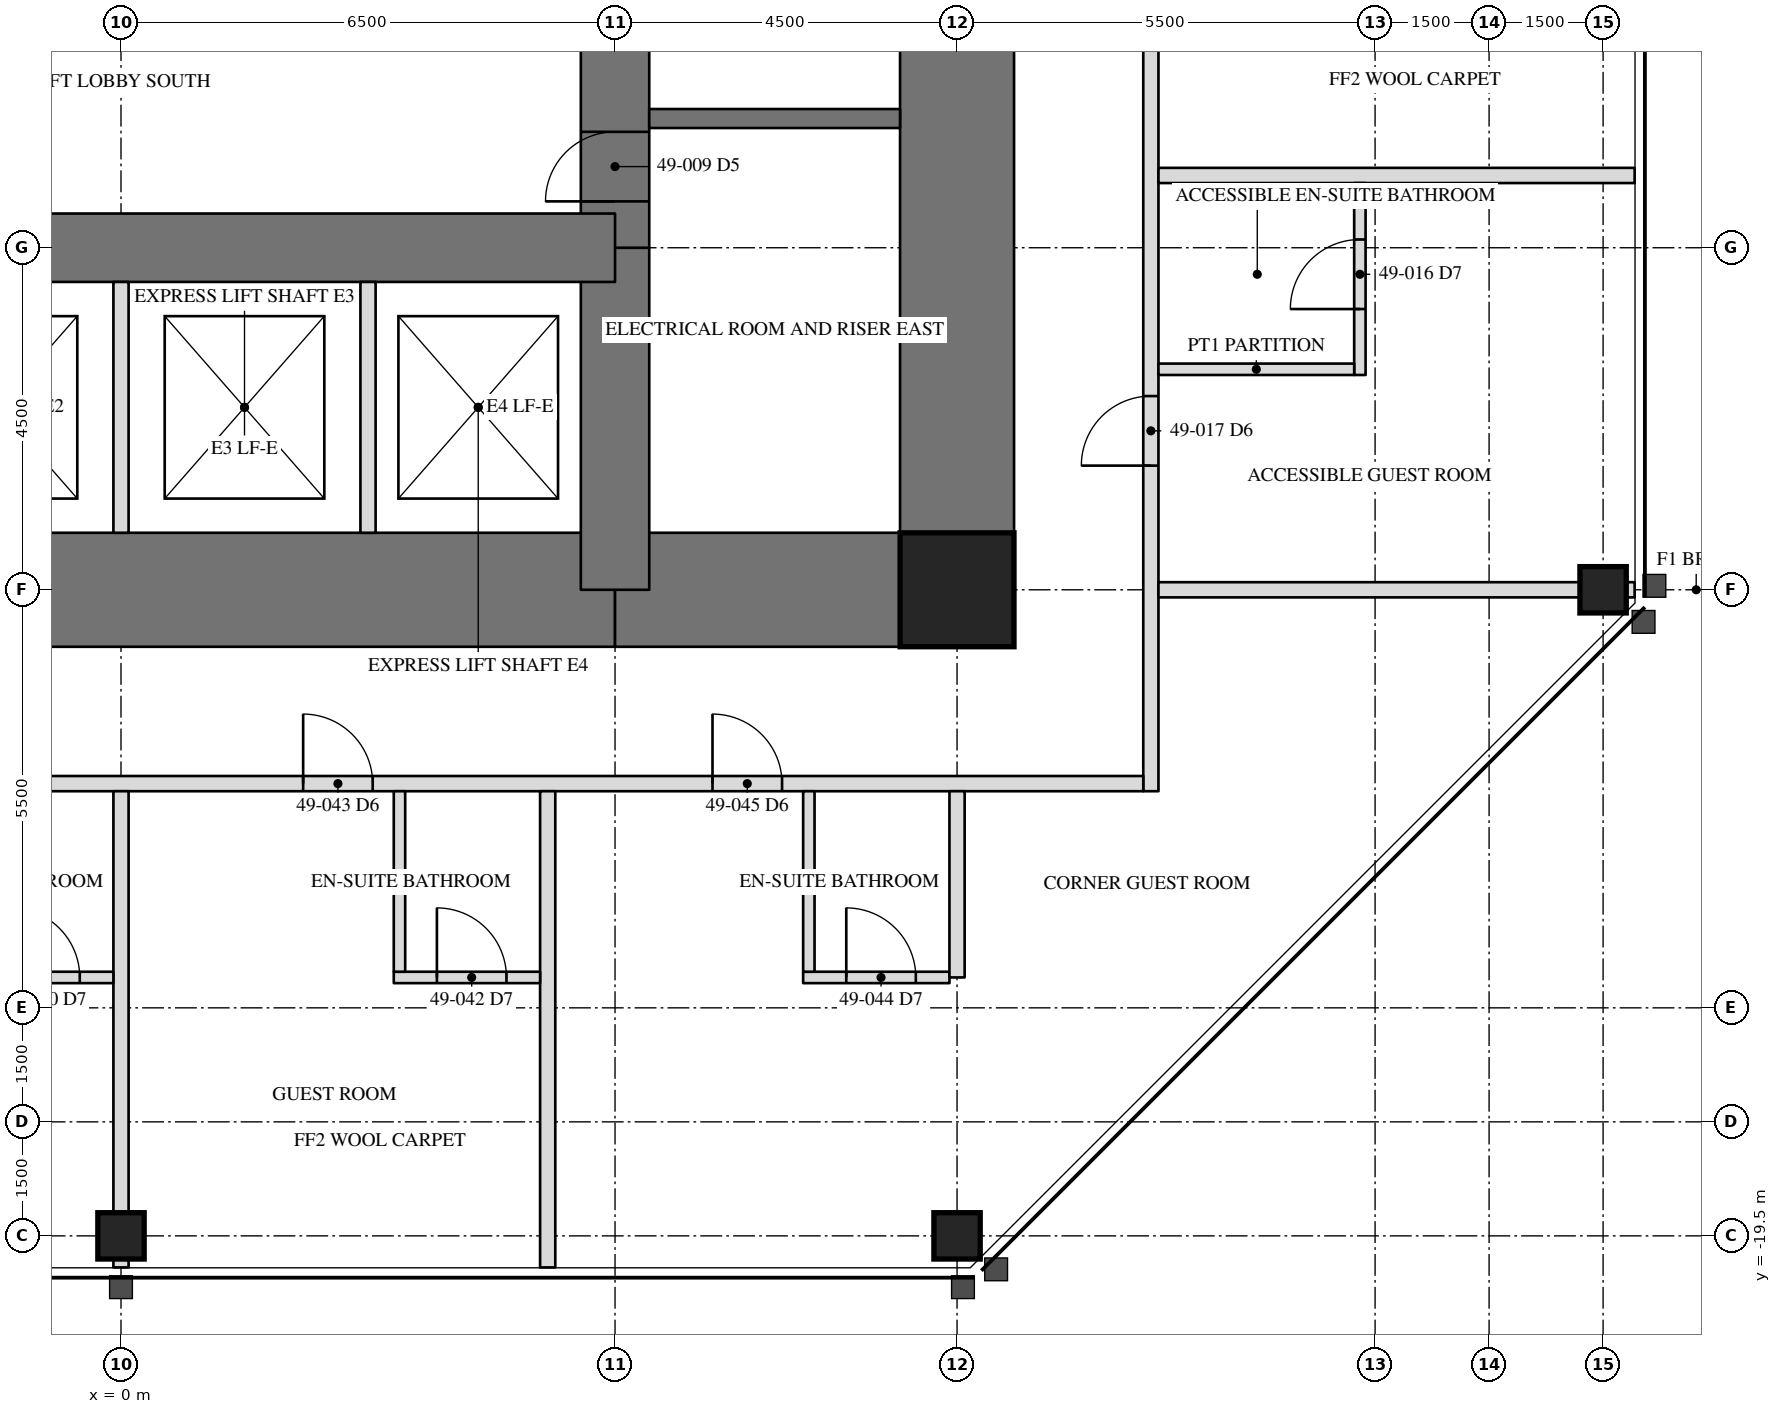
"""IFC4 building model, lengths in metres.
Left out: names, types, materials, properties, quantities, classifications, styles, units other than length and angle.
Written with IfcOpenShell. Run it as: python <this file> out.ifc"""

import sys

from ifc_helpers import new_model, si_unit, direction, frame, frame_2d, origin, origin_2d, place, context, subcontext, project, spatial, rectangle, hollow_rectangle, extrude, element, fill, save


model = new_model("IFC4")
c1 = context("Model", 3, precision=1e-05, world=origin(), true_north=direction((0.0, 1.0)))
c2 = subcontext(c1, "Body", "Model", "MODEL_VIEW")
j1 = project(units=[si_unit("LENGTHUNIT", "METRE"), si_unit("PLANEANGLEUNIT", "RADIAN")], contexts=[c1])
p1 = place(None, origin())
s1 = spatial("IfcSite", under=j1, at=p1, CompositionType="ELEMENT")
p2 = place(p1, origin())
s2 = spatial("IfcBuilding", under=s1, at=p2, CompositionType="ELEMENT")
p3 = place(p2, frame((0.0, 0.0, 208.2)))
s3 = spatial("IfcBuildingStorey", under=s2, at=p3, CompositionType="ELEMENT", Elevation=208.2)
for number, where, z_axis, x_axis in (
    (1, (0.0, -19.5, 0.0), (0.0, 0.0, 1.0), (1.0, 0.0, 0.0)),
    (2, (11.0, -19.5, 0.0), (0.0, 0.0, 1.0), (1.0, 0.0, 0.0)),
    (3, (19.5, -11.0, 0.0), (0.0, 0.0, 1.0), (0.0, 1.0, 0.0)),
):
    element("IfcColumn", number, at=place(p3, frame(where, z_axis=z_axis, x_axis=x_axis)), inside=s3, PredefinedType="COLUMN", context=c2, shape_type="SweptSolid", body=[
        extrude(hollow_rectangle(XDim=0.61, YDim=0.61, WallThickness=0.076, at=origin_2d()), origin(), (0.0, 0.0, 1.0), 3.5),
    ])
p4 = place(p3, frame((11.0, -11.0, 0.0), z_axis=(0.0, 0.0, 1.0), x_axis=(0.0, 1.0, 0.0)))
e4 = element("IfcWall", 4, at=p4, inside=s3, PredefinedType="SHEAR", context=c2, shape_type="SweptSolid", body=[
    extrude(rectangle(XDim=22.0, YDim=1.5, at=frame_2d((11.0, 0.0))), origin(), (0.0, 0.0, 1.0), 3.5),
])
p5 = place(p4, frame((15.393, 0.0, 0.0)))
e5 = element("IfcOpeningElement", 5, at=p5, cuts=e4, PredefinedType="OPENING", context=c2, shape_type="SweptSolid", body=[
    extrude(rectangle(XDim=0.915, YDim=2.134, at=frame_2d((0.458, 1.067))), frame((0.0, 0.76, 0.0), z_axis=(0.0, -1.0, 0.0), x_axis=(1.0, 0.0, 0.0)), (0.0, 0.0, 1.0), 1.52),
])
p6 = place(p3, frame((-6.5, -11.0, 0.0), z_axis=(0.0, 0.0, 1.0), x_axis=(1.0, 0.0, 0.0)))
e6 = element("IfcWall", 6, at=p6, inside=s3, PredefinedType="SHEAR", context=c2, shape_type="SweptSolid", body=[
    extrude(rectangle(XDim=13.0, YDim=1.5, at=frame_2d((6.5, 0.0))), origin(), (0.0, 0.0, 1.0), 3.5),
])
p7 = place(p3, frame((6.5, -11.0, 0.0), z_axis=(0.0, 0.0, 1.0), x_axis=(1.0, 0.0, 0.0)))
e7 = element("IfcWall", 7, at=p7, inside=s3, PredefinedType="SHEAR", context=c2, shape_type="SweptSolid", body=[
    extrude(rectangle(XDim=4.5, YDim=1.5, at=frame_2d((2.25, 0.0))), origin(), (0.0, 0.0, 1.0), 3.5),
])
p8 = place(p3, frame((6.5, -11.0, 0.0), z_axis=(0.0, 0.0, 1.0), x_axis=(0.0, 1.0, 0.0)))
e8 = element("IfcWall", 8, at=p8, inside=s3, PredefinedType="SHEAR", context=c2, shape_type="SweptSolid", body=[
    extrude(rectangle(XDim=4.5, YDim=0.9, at=frame_2d((2.25, 0.0))), origin(), (0.0, 0.0, 1.0), 3.5),
])
p9 = place(p3, frame((6.5, -6.5, 0.0), z_axis=(0.0, 0.0, 1.0), x_axis=(0.0, 1.0, 0.0)))
e9 = element("IfcWall", 9, at=p9, inside=s3, PredefinedType="SHEAR", context=c2, shape_type="SweptSolid", body=[
    extrude(rectangle(XDim=13.0, YDim=0.9, at=frame_2d((6.5, 0.0))), origin(), (0.0, 0.0, 1.0), 3.5),
])
p10 = place(p9, frame((10.893, 0.0, 0.0)))
e10 = element("IfcOpeningElement", 10, at=p10, cuts=e9, PredefinedType="OPENING", context=c2, shape_type="SweptSolid", body=[
    extrude(rectangle(XDim=0.915, YDim=2.134, at=frame_2d((0.458, 1.067))), frame((0.0, 0.46, 0.0), z_axis=(0.0, -1.0, 0.0), x_axis=(1.0, 0.0, 0.0)), (0.0, 0.0, 1.0), 0.92),
])
p11 = place(p9, frame((0.61, 0.0, 0.0)))
e11 = element("IfcOpeningElement", 11, at=p11, cuts=e9, PredefinedType="OPENING", context=c2, shape_type="SweptSolid", body=[
    extrude(rectangle(XDim=0.915, YDim=2.134, at=frame_2d((0.458, 1.067))), frame((0.0, 0.46, 0.0), z_axis=(0.0, -1.0, 0.0), x_axis=(1.0, 0.0, 0.0)), (0.0, 0.0, 1.0), 0.92),
])
p12 = place(p3, frame((-6.5, -6.5, 0.0), z_axis=(0.0, 0.0, 1.0), x_axis=(1.0, 0.0, 0.0)))
e12 = element("IfcWall", 12, at=p12, inside=s3, PredefinedType="SHEAR", context=c2, shape_type="SweptSolid", body=[
    extrude(rectangle(XDim=13.0, YDim=0.9, at=frame_2d((6.5, 0.0))), origin(), (0.0, 0.0, 1.0), 3.5),
])
p13 = place(p12, frame((1.267, 0.0, 0.0)))
e13 = element("IfcOpeningElement", 13, at=p13, cuts=e12, PredefinedType="OPENING", context=c2, shape_type="SweptSolid", body=[
    extrude(rectangle(XDim=1.067, YDim=2.134, at=frame_2d((0.533, 1.067))), frame((0.0, 0.46, 0.0), z_axis=(0.0, -1.0, 0.0), x_axis=(1.0, 0.0, 0.0)), (0.0, 0.0, 1.0), 0.92),
])
p14 = place(p12, frame((4.342, 0.0, 0.0)))
e14 = element("IfcOpeningElement", 14, at=p14, cuts=e12, PredefinedType="OPENING", context=c2, shape_type="SweptSolid", body=[
    extrude(rectangle(XDim=1.067, YDim=2.134, at=frame_2d((0.533, 1.067))), frame((0.0, 0.46, 0.0), z_axis=(0.0, -1.0, 0.0), x_axis=(1.0, 0.0, 0.0)), (0.0, 0.0, 1.0), 0.92),
])
p15 = place(p3, frame((11.0, -11.0, 0.0), z_axis=(0.0, 0.0, 1.0), x_axis=(1.0, 0.0, 0.0)))
e15 = element("IfcColumn", 15, at=p15, inside=s3, PredefinedType="COLUMN", context=c2, shape_type="SweptSolid", body=[
    extrude(hollow_rectangle(XDim=1.499, YDim=1.499, WallThickness=0.102, at=origin_2d()), origin(), (0.0, 0.0, 1.0), 3.5),
])
p16 = place(p3, frame((6.95, -4.8, 0.0), z_axis=(0.0, 0.0, 1.0), x_axis=(1.0, 0.0, 0.0)))
e16 = element("IfcWall", 16, at=p16, inside=s3, PredefinedType="SOLIDWALL", context=c2, shape_type="SweptSolid", body=[
    extrude(rectangle(XDim=3.3, YDim=0.25, at=frame_2d((1.65, 0.0))), origin(), (0.0, 0.0, 1.0), 3.31),
])
for number, where, z_axis, x_axis in (
    (17, (0.0, -10.25, 0.0), (0.0, 0.0, 1.0), (0.0, 1.0, 0.0)),
    (18, (3.25, -10.25, 0.0), (0.0, 0.0, 1.0), (0.0, 1.0, 0.0)),
):
    element("IfcWall", number, at=place(p3, frame(where, z_axis=z_axis, x_axis=x_axis)), inside=s3, PredefinedType="PARTITIONING", context=c2, shape_type="SweptSolid", body=[
        extrude(rectangle(XDim=3.3, YDim=0.2, at=frame_2d((1.65, 0.0))), origin(), (0.0, 0.0, 1.0), 3.31),
    ])
p17 = place(p3, frame((13.55, -13.65, 0.0), z_axis=(0.0, 0.0, 1.0), x_axis=(0.0, 1.0, 0.0)))
e19 = element("IfcWall", 19, at=p17, inside=s3, PredefinedType="PARTITIONING", context=c2, shape_type="SweptSolid", body=[
    extrude(rectangle(XDim=27.1, YDim=0.2, at=frame_2d((13.55, 0.0))), origin(), (0.0, 0.0, 1.0), 3.31),
])
p18 = place(p17, frame((4.283, 0.0, 0.0)))
e20 = element("IfcOpeningElement", 20, at=p18, cuts=e19, PredefinedType="OPENING", context=c2, shape_type="SweptSolid", body=[
    extrude(rectangle(XDim=0.915, YDim=2.134, at=frame_2d((0.458, 1.067))), frame((0.0, 0.11, 0.0), z_axis=(0.0, -1.0, 0.0), x_axis=(1.0, 0.0, 0.0)), (0.0, 0.0, 1.0), 0.22),
])
p19 = place(p17, frame((10.433, 0.0, 0.0)))
e21 = element("IfcOpeningElement", 21, at=p19, cuts=e19, PredefinedType="OPENING", context=c2, shape_type="SweptSolid", body=[
    extrude(rectangle(XDim=0.915, YDim=2.134, at=frame_2d((0.458, 1.067))), frame((0.0, 0.11, 0.0), z_axis=(0.0, -1.0, 0.0), x_axis=(1.0, 0.0, 0.0)), (0.0, 0.0, 1.0), 0.22),
])
p20 = place(p17, frame((16.046, 0.0, 0.0)))
e22 = element("IfcOpeningElement", 22, at=p20, cuts=e19, PredefinedType="OPENING", context=c2, shape_type="SweptSolid", body=[
    extrude(rectangle(XDim=0.915, YDim=2.134, at=frame_2d((0.458, 1.067))), frame((0.0, 0.11, 0.0), z_axis=(0.0, -1.0, 0.0), x_axis=(1.0, 0.0, 0.0)), (0.0, 0.0, 1.0), 0.22),
])
p21 = place(p17, frame((21.433, 0.0, 0.0)))
e23 = element("IfcOpeningElement", 23, at=p21, cuts=e19, PredefinedType="OPENING", context=c2, shape_type="SweptSolid", body=[
    extrude(rectangle(XDim=0.915, YDim=2.134, at=frame_2d((0.458, 1.067))), frame((0.0, 0.11, 0.0), z_axis=(0.0, -1.0, 0.0), x_axis=(1.0, 0.0, 0.0)), (0.0, 0.0, 1.0), 0.22),
])
p22 = place(p3, frame((-13.65, -13.55, 0.0), z_axis=(0.0, 0.0, 1.0), x_axis=(1.0, 0.0, 0.0)))
e24 = element("IfcWall", 24, at=p22, inside=s3, PredefinedType="PARTITIONING", context=c2, shape_type="SweptSolid", body=[
    extrude(rectangle(XDim=27.1, YDim=0.2, at=frame_2d((13.55, 0.0))), origin(), (0.0, 0.0, 1.0), 3.31),
])
p23 = place(p22, frame((4.884, 0.0, 0.0)))
e25 = element("IfcOpeningElement", 25, at=p23, cuts=e24, PredefinedType="OPENING", context=c2, shape_type="SweptSolid", body=[
    extrude(rectangle(XDim=0.915, YDim=2.134, at=frame_2d((0.458, 1.067))), frame((0.0, 0.11, 0.0), z_axis=(0.0, -1.0, 0.0), x_axis=(1.0, 0.0, 0.0)), (0.0, 0.0, 1.0), 0.22),
])
p24 = place(p22, frame((10.433, 0.0, 0.0)))
e26 = element("IfcOpeningElement", 26, at=p24, cuts=e24, PredefinedType="OPENING", context=c2, shape_type="SweptSolid", body=[
    extrude(rectangle(XDim=0.915, YDim=2.134, at=frame_2d((0.458, 1.067))), frame((0.0, 0.11, 0.0), z_axis=(0.0, -1.0, 0.0), x_axis=(1.0, 0.0, 0.0)), (0.0, 0.0, 1.0), 0.22),
])
p25 = place(p22, frame((16.046, 0.0, 0.0)))
e27 = element("IfcOpeningElement", 27, at=p25, cuts=e24, PredefinedType="OPENING", context=c2, shape_type="SweptSolid", body=[
    extrude(rectangle(XDim=0.915, YDim=2.134, at=frame_2d((0.458, 1.067))), frame((0.0, 0.11, 0.0), z_axis=(0.0, -1.0, 0.0), x_axis=(1.0, 0.0, 0.0)), (0.0, 0.0, 1.0), 0.22),
])
p26 = place(p22, frame((21.433, 0.0, 0.0)))
e28 = element("IfcOpeningElement", 28, at=p26, cuts=e24, PredefinedType="OPENING", context=c2, shape_type="SweptSolid", body=[
    extrude(rectangle(XDim=0.915, YDim=2.134, at=frame_2d((0.458, 1.067))), frame((0.0, 0.11, 0.0), z_axis=(0.0, -1.0, 0.0), x_axis=(1.0, 0.0, 0.0)), (0.0, 0.0, 1.0), 0.22),
])
p27 = place(p3, frame((13.65, -11.0, 0.0), z_axis=(0.0, 0.0, 1.0), x_axis=(1.0, 0.0, 0.0)))
e29 = element("IfcWall", 29, at=p27, inside=s3, PredefinedType="PARTITIONING", context=c2, shape_type="SweptSolid", body=[
    extrude(rectangle(XDim=6.265, YDim=0.2, at=frame_2d((3.133, 0.0))), origin(), (0.0, 0.0, 1.0), 2.802),
])
p28 = place(p3, frame((13.65, -5.549, 0.0), z_axis=(0.0, 0.0, 1.0), x_axis=(1.0, 0.0, 0.0)))
e30 = element("IfcWall", 30, at=p28, inside=s3, PredefinedType="PARTITIONING", context=c2, shape_type="SweptSolid", body=[
    extrude(rectangle(XDim=6.265, YDim=0.2, at=frame_2d((3.133, 0.0))), origin(), (0.0, 0.0, 1.0), 3.31),
])
p29 = place(p3, frame((16.3, -8.174, 0.0), z_axis=(0.0, 0.0, 1.0), x_axis=(0.0, 1.0, 0.0)))
e31 = element("IfcWall", 31, at=p29, inside=s3, PredefinedType="PARTITIONING", context=c2, shape_type="SweptSolid", body=[
    extrude(rectangle(XDim=2.525, YDim=0.15, at=frame_2d((1.263, 0.0))), origin(), (0.0, 0.0, 1.0), 3.31),
])
p30 = place(p29, frame((0.867, 0.0, 0.0)))
e32 = element("IfcOpeningElement", 32, at=p30, cuts=e31, PredefinedType="OPENING", context=c2, shape_type="SweptSolid", body=[
    extrude(rectangle(XDim=0.915, YDim=2.032, at=frame_2d((0.458, 1.016))), frame((0.0, 0.085, 0.0), z_axis=(0.0, -1.0, 0.0), x_axis=(1.0, 0.0, 0.0)), (0.0, 0.0, 1.0), 0.17),
])
p31 = place(p3, frame((13.65, -8.099, 0.0), z_axis=(0.0, 0.0, 1.0), x_axis=(1.0, 0.0, 0.0)))
e33 = element("IfcWall", 33, at=p31, inside=s3, PredefinedType="PARTITIONING", context=c2, shape_type="SweptSolid", body=[
    extrude(rectangle(XDim=2.575, YDim=0.15, at=frame_2d((1.288, 0.0))), origin(), (0.0, 0.0, 1.0), 3.31),
])
p32 = place(p3, frame((0.0, -13.65, 0.0), z_axis=(0.0, 0.0, 1.0), x_axis=(0.0, -1.0, 0.0)))
e34 = element("IfcWall", 34, at=p32, inside=s3, PredefinedType="PARTITIONING", context=c2, shape_type="SweptSolid", body=[
    extrude(rectangle(XDim=6.265, YDim=0.2, at=frame_2d((3.133, 0.0))), origin(), (0.0, 0.0, 1.0), 2.802),
])
p33 = place(p3, frame((5.614, -13.65, 0.0), z_axis=(0.0, 0.0, 1.0), x_axis=(0.0, -1.0, 0.0)))
e35 = element("IfcWall", 35, at=p33, inside=s3, PredefinedType="PARTITIONING", context=c2, shape_type="SweptSolid", body=[
    extrude(rectangle(XDim=6.265, YDim=0.2, at=frame_2d((3.133, 0.0))), origin(), (0.0, 0.0, 1.0), 3.31),
])
p34 = place(p3, frame((-2.025, -16.1, 0.0), z_axis=(0.0, 0.0, 1.0), x_axis=(1.0, 0.0, 0.0)))
e36 = element("IfcWall", 36, at=p34, inside=s3, PredefinedType="PARTITIONING", context=c2, shape_type="SweptSolid", body=[
    extrude(rectangle(XDim=1.925, YDim=0.15, at=frame_2d((0.962, 0.0))), origin(), (0.0, 0.0, 1.0), 3.31),
])
p35 = place(p34, frame((0.567, 0.0, 0.0)))
e37 = element("IfcOpeningElement", 37, at=p35, cuts=e36, PredefinedType="OPENING", context=c2, shape_type="SweptSolid", body=[
    extrude(rectangle(XDim=0.915, YDim=2.032, at=frame_2d((0.458, 1.016))), frame((0.0, 0.085, 0.0), z_axis=(0.0, -1.0, 0.0), x_axis=(1.0, 0.0, 0.0)), (0.0, 0.0, 1.0), 0.17),
])
p36 = place(p3, frame((3.589, -16.1, 0.0), z_axis=(0.0, 0.0, 1.0), x_axis=(1.0, 0.0, 0.0)))
e38 = element("IfcWall", 38, at=p36, inside=s3, PredefinedType="PARTITIONING", context=c2, shape_type="SweptSolid", body=[
    extrude(rectangle(XDim=1.925, YDim=0.15, at=frame_2d((0.962, 0.0))), origin(), (0.0, 0.0, 1.0), 3.31),
])
p37 = place(p36, frame((0.567, 0.0, 0.0)))
e39 = element("IfcOpeningElement", 39, at=p37, cuts=e38, PredefinedType="OPENING", context=c2, shape_type="SweptSolid", body=[
    extrude(rectangle(XDim=0.915, YDim=2.032, at=frame_2d((0.458, 1.016))), frame((0.0, 0.085, 0.0), z_axis=(0.0, -1.0, 0.0), x_axis=(1.0, 0.0, 0.0)), (0.0, 0.0, 1.0), 0.17),
])
p38 = place(p3, frame((3.664, -13.65, 0.0), z_axis=(0.0, 0.0, 1.0), x_axis=(0.0, -1.0, 0.0)))
e40 = element("IfcWall", 40, at=p38, inside=s3, PredefinedType="PARTITIONING", context=c2, shape_type="SweptSolid", body=[
    extrude(rectangle(XDim=2.375, YDim=0.15, at=frame_2d((1.188, 0.0))), origin(), (0.0, 0.0, 1.0), 2.703),
])
p39 = place(p3, frame((8.975, -16.1, 0.0), z_axis=(0.0, 0.0, 1.0), x_axis=(1.0, 0.0, 0.0)))
e41 = element("IfcWall", 41, at=p39, inside=s3, PredefinedType="PARTITIONING", context=c2, shape_type="SweptSolid", body=[
    extrude(rectangle(XDim=1.925, YDim=0.15, at=frame_2d((0.962, 0.0))), origin(), (0.0, 0.0, 1.0), 3.31),
])
p40 = place(p39, frame((0.567, 0.0, 0.0)))
e42 = element("IfcOpeningElement", 42, at=p40, cuts=e41, PredefinedType="OPENING", context=c2, shape_type="SweptSolid", body=[
    extrude(rectangle(XDim=0.915, YDim=2.032, at=frame_2d((0.458, 1.016))), frame((0.0, 0.085, 0.0), z_axis=(0.0, -1.0, 0.0), x_axis=(1.0, 0.0, 0.0)), (0.0, 0.0, 1.0), 0.17),
])
p41 = place(p3, frame((9.05, -13.65, 0.0), z_axis=(0.0, 0.0, 1.0), x_axis=(0.0, -1.0, 0.0)))
e43 = element("IfcWall", 43, at=p41, inside=s3, PredefinedType="PARTITIONING", context=c2, shape_type="SweptSolid", body=[
    extrude(rectangle(XDim=2.375, YDim=0.15, at=frame_2d((1.188, 0.0))), origin(), (0.0, 0.0, 1.0), 3.31),
])
p42 = place(p3, frame((11.0, -13.65, 0.0), z_axis=(0.0, 0.0, 1.0), x_axis=(0.0, -1.0, 0.0)))
e44 = element("IfcWall", 44, at=p42, inside=s3, PredefinedType="PARTITIONING", context=c2, shape_type="SweptSolid", body=[
    extrude(rectangle(XDim=2.45, YDim=0.2, at=frame_2d((1.225, 0.0))), origin(), (0.0, 0.0, 1.0), 2.802),
])
p43 = place(p11, origin())
e45 = element("IfcDoor", 45, at=p43, inside=s3, OperationType="SINGLE_SWING_RIGHT", PredefinedType="DOOR", context=c2, shape_type="SweptSolid", body=[
    extrude(rectangle(XDim=0.915, YDim=2.134, at=frame_2d((0.458, 1.067))), frame((0.0, -0.375, 0.0), z_axis=(0.0, -1.0, 0.0), x_axis=(1.0, 0.0, 0.0)), (0.0, 0.0, 1.0), 0.05),
])
fill(e11, e45)
p44 = place(p30, origin())
e46 = element("IfcDoor", 46, at=p44, inside=s3, OperationType="SINGLE_SWING_LEFT", PredefinedType="DOOR", context=c2, shape_type="SweptSolid", body=[
    extrude(rectangle(XDim=0.915, YDim=2.032, at=frame_2d((0.458, 1.016))), frame((0.0, 0.025, 0.0), z_axis=(0.0, -1.0, 0.0), x_axis=(1.0, 0.0, 0.0)), (0.0, 0.0, 1.0), 0.05),
])
fill(e32, e46)
p45 = place(p18, origin())
e47 = element("IfcDoor", 47, at=p45, inside=s3, OperationType="SINGLE_SWING_LEFT", PredefinedType="DOOR", context=c2, shape_type="SweptSolid", body=[
    extrude(rectangle(XDim=0.915, YDim=2.134, at=frame_2d((0.458, 1.067))), frame((0.0, 0.025, 0.0), z_axis=(0.0, -1.0, 0.0), x_axis=(1.0, 0.0, 0.0)), (0.0, 0.0, 1.0), 0.05),
])
fill(e20, e47)
p46 = place(p35, origin())
e48 = element("IfcDoor", 48, at=p46, inside=s3, OperationType="SINGLE_SWING_LEFT", PredefinedType="DOOR", context=c2, shape_type="SweptSolid", body=[
    extrude(rectangle(XDim=0.915, YDim=2.032, at=frame_2d((0.458, 1.016))), frame((0.0, 0.025, 0.0), z_axis=(0.0, -1.0, 0.0), x_axis=(1.0, 0.0, 0.0)), (0.0, 0.0, 1.0), 0.05),
])
fill(e37, e48)
p47 = place(p37, origin())
e49 = element("IfcDoor", 49, at=p47, inside=s3, OperationType="SINGLE_SWING_LEFT", PredefinedType="DOOR", context=c2, shape_type="SweptSolid", body=[
    extrude(rectangle(XDim=0.915, YDim=2.032, at=frame_2d((0.458, 1.016))), frame((0.0, 0.025, 0.0), z_axis=(0.0, -1.0, 0.0), x_axis=(1.0, 0.0, 0.0)), (0.0, 0.0, 1.0), 0.05),
])
fill(e39, e49)
p48 = place(p25, origin())
e50 = element("IfcDoor", 50, at=p48, inside=s3, OperationType="SINGLE_SWING_LEFT", PredefinedType="DOOR", context=c2, shape_type="SweptSolid", body=[
    extrude(rectangle(XDim=0.915, YDim=2.134, at=frame_2d((0.458, 1.067))), frame((0.0, 0.025, 0.0), z_axis=(0.0, -1.0, 0.0), x_axis=(1.0, 0.0, 0.0)), (0.0, 0.0, 1.0), 0.05),
])
fill(e27, e50)
p49 = place(p40, origin())
e51 = element("IfcDoor", 51, at=p49, inside=s3, OperationType="SINGLE_SWING_LEFT", PredefinedType="DOOR", context=c2, shape_type="SweptSolid", body=[
    extrude(rectangle(XDim=0.915, YDim=2.032, at=frame_2d((0.458, 1.016))), frame((0.0, 0.025, 0.0), z_axis=(0.0, -1.0, 0.0), x_axis=(1.0, 0.0, 0.0)), (0.0, 0.0, 1.0), 0.05),
])
fill(e42, e51)
p50 = place(p26, origin())
e52 = element("IfcDoor", 52, at=p50, inside=s3, OperationType="SINGLE_SWING_LEFT", PredefinedType="DOOR", context=c2, shape_type="SweptSolid", body=[
    extrude(rectangle(XDim=0.915, YDim=2.134, at=frame_2d((0.458, 1.067))), frame((0.0, 0.025, 0.0), z_axis=(0.0, -1.0, 0.0), x_axis=(1.0, 0.0, 0.0)), (0.0, 0.0, 1.0), 0.05),
])
fill(e28, e52)
save(model, sys.argv[1])
